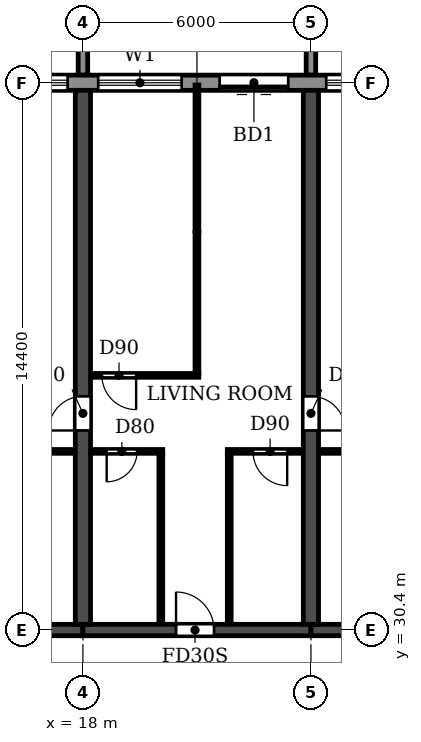
"""IFC4 building model, lengths in metres.
Left out: names, types, materials, properties, quantities, classifications, styles, units other than length and angle.
Written with IfcOpenShell. Run it as: python <this file> out.ifc"""

import sys

from ifc_helpers import new_model, si_unit, direction, frame, frame_2d, origin, place, context, subcontext, project, spatial, polyline, rectangle, outline, extrude, source, transform, mapped, element, fill, save


model = new_model("IFC4")
c1 = context("Model", 3, precision=1e-05, world=origin(), true_north=direction((0.0, 1.0)))
c2 = subcontext(c1, "Body", "Model", "MODEL_VIEW")
j1 = project(units=[si_unit("LENGTHUNIT", "METRE"), si_unit("PLANEANGLEUNIT", "RADIAN")], contexts=[c1])
p1 = place(None, origin())
s1 = spatial("IfcSite", under=j1, at=p1, CompositionType="ELEMENT")
p2 = place(p1, origin())
s2 = spatial("IfcBuilding", under=s1, at=p2, CompositionType="ELEMENT")
p3 = place(p2, frame((0.0, 0.0, 49.8)))
s3 = spatial("IfcBuildingStorey", under=s2, at=p3, CompositionType="ELEMENT", Elevation=49.8)
p4 = place(p3, frame((18.0, 30.55, 0.0), z_axis=(0.0, 0.0, 1.0), x_axis=(0.0, 1.0, 0.0)))
e1 = element("IfcWall", 1, at=p4, inside=s3, PredefinedType="SHEAR", context=c2, shape_type="SweptSolid", body=[
    extrude(rectangle(XDim=14.05, YDim=0.4, at=frame_2d((7.025, 0.0))), origin(), (0.0, 0.0, 1.0), 3.0),
])
p5 = place(p4, frame((5.1, 0.0, 0.0)))
e2 = element("IfcOpeningElement", 2, at=p5, cuts=e1, PredefinedType="OPENING", context=c2, shape_type="SweptSolid", body=[
    extrude(rectangle(XDim=0.9, YDim=2.1, at=frame_2d((0.45, 1.05))), frame((0.0, 0.21, 0.0), z_axis=(0.0, -1.0, 0.0), x_axis=(1.0, 0.0, 0.0)), (0.0, 0.0, 1.0), 0.42),
])
p6 = place(p3, frame((24.0, 30.55, 0.0), z_axis=(0.0, 0.0, 1.0), x_axis=(0.0, 1.0, 0.0)))
e3 = element("IfcWall", 3, at=p6, inside=s3, PredefinedType="SHEAR", context=c2, shape_type="SweptSolid", body=[
    extrude(rectangle(XDim=14.05, YDim=0.4, at=frame_2d((7.025, 0.0))), origin(), (0.0, 0.0, 1.0), 3.0),
])
p7 = place(p6, frame((5.1, 0.0, 0.0)))
e4 = element("IfcOpeningElement", 4, at=p7, cuts=e3, PredefinedType="OPENING", context=c2, shape_type="SweptSolid", body=[
    extrude(rectangle(XDim=0.9, YDim=2.1, at=frame_2d((0.45, 1.05))), frame((0.0, 0.21, 0.0), z_axis=(0.0, -1.0, 0.0), x_axis=(1.0, 0.0, 0.0)), (0.0, 0.0, 1.0), 0.42),
])
p8 = place(p3, frame((12.0, 30.4, 0.0), z_axis=(0.0, 0.0, 1.0), x_axis=(1.0, 0.0, 0.0)))
e5 = element("IfcWall", 5, at=p8, inside=s3, PredefinedType="SHEAR", context=c2, shape_type="SweptSolid", body=[
    extrude(rectangle(XDim=6.0, YDim=0.3, at=frame_2d((3.0, 0.0))), origin(), (0.0, 0.0, 1.0), 2.4),
])
p9 = place(p3, frame((18.0, 30.4, 0.0), z_axis=(0.0, 0.0, 1.0), x_axis=(1.0, 0.0, 0.0)))
e6 = element("IfcWall", 6, at=p9, inside=s3, PredefinedType="SHEAR", context=c2, shape_type="SweptSolid", body=[
    extrude(rectangle(XDim=6.0, YDim=0.3, at=frame_2d((3.0, 0.0))), origin(), (0.0, 0.0, 1.0), 2.4),
])
p10 = place(p9, frame((2.45, 0.0, 0.0)))
e7 = element("IfcOpeningElement", 7, at=p10, cuts=e6, PredefinedType="OPENING", context=c2, shape_type="SweptSolid", body=[
    extrude(rectangle(XDim=1.0, YDim=2.1, at=frame_2d((0.5, 1.05))), frame((0.0, 0.16, 0.0), z_axis=(0.0, -1.0, 0.0), x_axis=(1.0, 0.0, 0.0)), (0.0, 0.0, 1.0), 0.32),
])
p11 = place(p3, frame((24.0, 30.4, 0.0), z_axis=(0.0, 0.0, 1.0), x_axis=(1.0, 0.0, 0.0)))
e8 = element("IfcWall", 8, at=p11, inside=s3, PredefinedType="SHEAR", context=c2, shape_type="SweptSolid", body=[
    extrude(rectangle(XDim=6.0, YDim=0.3, at=frame_2d((3.0, 0.0))), origin(), (0.0, 0.0, 1.0), 2.4),
])
p12 = place(p3, frame((97.317, 44.8, 0.0), z_axis=(0.0, 0.0, 1.0), x_axis=(-1.0, 0.0, 0.0)))
e9 = element("IfcWall", 9, at=p12, inside=s3, PredefinedType="STANDARD", context=c2, shape_type="SweptSolid", body=[
    extrude(rectangle(XDim=92.634, YDim=0.4, at=frame_2d((46.317, 0.0))), origin(), (0.0, 0.0, 1.0), 3.0),
])
p13 = place(p12, frame((88.917, 0.0, 0.0)))
e10 = element("IfcOpeningElement", 10, at=p13, cuts=e9, PredefinedType="OPENING", context=c2, shape_type="SweptSolid", body=[
    extrude(rectangle(XDim=1.8, YDim=2.4, at=frame_2d((0.9, 1.2))), frame((0.0, 0.21, 0.0), z_axis=(0.0, -1.0, 0.0), x_axis=(1.0, 0.0, 0.0)), (0.0, 0.0, 1.0), 0.42),
])
p14 = place(p12, frame((85.717, 0.0, 0.9)))
e11 = element("IfcOpeningElement", 11, at=p14, cuts=e9, PredefinedType="OPENING", context=c2, shape_type="SweptSolid", body=[
    extrude(rectangle(XDim=2.2, YDim=1.5, at=frame_2d((1.1, 0.75))), frame((0.0, 0.21, 0.0), z_axis=(0.0, -1.0, 0.0), x_axis=(1.0, 0.0, 0.0)), (0.0, 0.0, 1.0), 0.42),
])
p15 = place(p12, frame((82.717, 0.0, 0.9)))
e12 = element("IfcOpeningElement", 12, at=p15, cuts=e9, PredefinedType="OPENING", context=c2, shape_type="SweptSolid", body=[
    extrude(rectangle(XDim=2.2, YDim=1.5, at=frame_2d((1.1, 0.75))), frame((0.0, 0.21, 0.0), z_axis=(0.0, -1.0, 0.0), x_axis=(1.0, 0.0, 0.0)), (0.0, 0.0, 1.0), 0.42),
])
p16 = place(p12, frame((79.717, 0.0, 0.9)))
e13 = element("IfcOpeningElement", 13, at=p16, cuts=e9, PredefinedType="OPENING", context=c2, shape_type="SweptSolid", body=[
    extrude(rectangle(XDim=2.2, YDim=1.5, at=frame_2d((1.1, 0.75))), frame((0.0, 0.21, 0.0), z_axis=(0.0, -1.0, 0.0), x_axis=(1.0, 0.0, 0.0)), (0.0, 0.0, 1.0), 0.42),
])
p17 = place(p12, frame((76.717, 0.0, 0.9)))
e14 = element("IfcOpeningElement", 14, at=p17, cuts=e9, PredefinedType="OPENING", context=c2, shape_type="SweptSolid", body=[
    extrude(rectangle(XDim=2.2, YDim=1.5, at=frame_2d((1.1, 0.75))), frame((0.0, 0.21, 0.0), z_axis=(0.0, -1.0, 0.0), x_axis=(1.0, 0.0, 0.0)), (0.0, 0.0, 1.0), 0.42),
])
p18 = place(p12, frame((73.917, 0.0, 0.0)))
e15 = element("IfcOpeningElement", 15, at=p18, cuts=e9, PredefinedType="OPENING", context=c2, shape_type="SweptSolid", body=[
    extrude(rectangle(XDim=1.8, YDim=2.4, at=frame_2d((0.9, 1.2))), frame((0.0, 0.21, 0.0), z_axis=(0.0, -1.0, 0.0), x_axis=(1.0, 0.0, 0.0)), (0.0, 0.0, 1.0), 0.42),
])
p19 = place(p12, frame((70.717, 0.0, 0.9)))
e16 = element("IfcOpeningElement", 16, at=p19, cuts=e9, PredefinedType="OPENING", context=c2, shape_type="SweptSolid", body=[
    extrude(rectangle(XDim=2.2, YDim=1.5, at=frame_2d((1.1, 0.75))), frame((0.0, 0.21, 0.0), z_axis=(0.0, -1.0, 0.0), x_axis=(1.0, 0.0, 0.0)), (0.0, 0.0, 1.0), 0.42),
])
p20 = place(p12, frame((67.717, 0.0, 0.9)))
e17 = element("IfcOpeningElement", 17, at=p20, cuts=e9, PredefinedType="OPENING", context=c2, shape_type="SweptSolid", body=[
    extrude(rectangle(XDim=2.2, YDim=1.5, at=frame_2d((1.1, 0.75))), frame((0.0, 0.21, 0.0), z_axis=(0.0, -1.0, 0.0), x_axis=(1.0, 0.0, 0.0)), (0.0, 0.0, 1.0), 0.42),
])
p21 = place(p12, frame((64.717, 0.0, 0.9)))
e18 = element("IfcOpeningElement", 18, at=p21, cuts=e9, PredefinedType="OPENING", context=c2, shape_type="SweptSolid", body=[
    extrude(rectangle(XDim=2.2, YDim=1.5, at=frame_2d((1.1, 0.75))), frame((0.0, 0.21, 0.0), z_axis=(0.0, -1.0, 0.0), x_axis=(1.0, 0.0, 0.0)), (0.0, 0.0, 1.0), 0.42),
])
p22 = place(p12, frame((61.917, 0.0, 0.0)))
e19 = element("IfcOpeningElement", 19, at=p22, cuts=e9, PredefinedType="OPENING", context=c2, shape_type="SweptSolid", body=[
    extrude(rectangle(XDim=1.8, YDim=2.4, at=frame_2d((0.9, 1.2))), frame((0.0, 0.21, 0.0), z_axis=(0.0, -1.0, 0.0), x_axis=(1.0, 0.0, 0.0)), (0.0, 0.0, 1.0), 0.42),
])
p23 = place(p12, frame((58.717, 0.0, 0.9)))
e20 = element("IfcOpeningElement", 20, at=p23, cuts=e9, PredefinedType="OPENING", context=c2, shape_type="SweptSolid", body=[
    extrude(rectangle(XDim=2.2, YDim=1.5, at=frame_2d((1.1, 0.75))), frame((0.0, 0.21, 0.0), z_axis=(0.0, -1.0, 0.0), x_axis=(1.0, 0.0, 0.0)), (0.0, 0.0, 1.0), 0.42),
])
p24 = place(p12, frame((55.717, 0.0, 0.9)))
e21 = element("IfcOpeningElement", 21, at=p24, cuts=e9, PredefinedType="OPENING", context=c2, shape_type="SweptSolid", body=[
    extrude(rectangle(XDim=2.2, YDim=1.5, at=frame_2d((1.1, 0.75))), frame((0.0, 0.21, 0.0), z_axis=(0.0, -1.0, 0.0), x_axis=(1.0, 0.0, 0.0)), (0.0, 0.0, 1.0), 0.42),
])
p25 = place(p12, frame((52.717, 0.0, 0.9)))
e22 = element("IfcOpeningElement", 22, at=p25, cuts=e9, PredefinedType="OPENING", context=c2, shape_type="SweptSolid", body=[
    extrude(rectangle(XDim=2.2, YDim=1.5, at=frame_2d((1.1, 0.75))), frame((0.0, 0.21, 0.0), z_axis=(0.0, -1.0, 0.0), x_axis=(1.0, 0.0, 0.0)), (0.0, 0.0, 1.0), 0.42),
])
p26 = place(p12, frame((49.917, 0.0, 0.0)))
e23 = element("IfcOpeningElement", 23, at=p26, cuts=e9, PredefinedType="OPENING", context=c2, shape_type="SweptSolid", body=[
    extrude(rectangle(XDim=1.8, YDim=2.4, at=frame_2d((0.9, 1.2))), frame((0.0, 0.21, 0.0), z_axis=(0.0, -1.0, 0.0), x_axis=(1.0, 0.0, 0.0)), (0.0, 0.0, 1.0), 0.42),
])
p27 = place(p12, frame((46.717, 0.0, 0.9)))
e24 = element("IfcOpeningElement", 24, at=p27, cuts=e9, PredefinedType="OPENING", context=c2, shape_type="SweptSolid", body=[
    extrude(rectangle(XDim=2.2, YDim=1.5, at=frame_2d((1.1, 0.75))), frame((0.0, 0.21, 0.0), z_axis=(0.0, -1.0, 0.0), x_axis=(1.0, 0.0, 0.0)), (0.0, 0.0, 1.0), 0.42),
])
p28 = place(p12, frame((43.717, 0.0, 0.9)))
e25 = element("IfcOpeningElement", 25, at=p28, cuts=e9, PredefinedType="OPENING", context=c2, shape_type="SweptSolid", body=[
    extrude(rectangle(XDim=2.2, YDim=1.5, at=frame_2d((1.1, 0.75))), frame((0.0, 0.21, 0.0), z_axis=(0.0, -1.0, 0.0), x_axis=(1.0, 0.0, 0.0)), (0.0, 0.0, 1.0), 0.42),
])
p29 = place(p12, frame((40.717, 0.0, 0.9)))
e26 = element("IfcOpeningElement", 26, at=p29, cuts=e9, PredefinedType="OPENING", context=c2, shape_type="SweptSolid", body=[
    extrude(rectangle(XDim=2.2, YDim=1.5, at=frame_2d((1.1, 0.75))), frame((0.0, 0.21, 0.0), z_axis=(0.0, -1.0, 0.0), x_axis=(1.0, 0.0, 0.0)), (0.0, 0.0, 1.0), 0.42),
])
p30 = place(p12, frame((37.917, 0.0, 0.0)))
e27 = element("IfcOpeningElement", 27, at=p30, cuts=e9, PredefinedType="OPENING", context=c2, shape_type="SweptSolid", body=[
    extrude(rectangle(XDim=1.8, YDim=2.4, at=frame_2d((0.9, 1.2))), frame((0.0, 0.21, 0.0), z_axis=(0.0, -1.0, 0.0), x_axis=(1.0, 0.0, 0.0)), (0.0, 0.0, 1.0), 0.42),
])
p31 = place(p12, frame((34.717, 0.0, 0.9)))
e28 = element("IfcOpeningElement", 28, at=p31, cuts=e9, PredefinedType="OPENING", context=c2, shape_type="SweptSolid", body=[
    extrude(rectangle(XDim=2.2, YDim=1.5, at=frame_2d((1.1, 0.75))), frame((0.0, 0.21, 0.0), z_axis=(0.0, -1.0, 0.0), x_axis=(1.0, 0.0, 0.0)), (0.0, 0.0, 1.0), 0.42),
])
p32 = place(p12, frame((31.717, 0.0, 0.9)))
e29 = element("IfcOpeningElement", 29, at=p32, cuts=e9, PredefinedType="OPENING", context=c2, shape_type="SweptSolid", body=[
    extrude(rectangle(XDim=2.2, YDim=1.5, at=frame_2d((1.1, 0.75))), frame((0.0, 0.21, 0.0), z_axis=(0.0, -1.0, 0.0), x_axis=(1.0, 0.0, 0.0)), (0.0, 0.0, 1.0), 0.42),
])
p33 = place(p12, frame((28.717, 0.0, 0.9)))
e30 = element("IfcOpeningElement", 30, at=p33, cuts=e9, PredefinedType="OPENING", context=c2, shape_type="SweptSolid", body=[
    extrude(rectangle(XDim=2.2, YDim=1.5, at=frame_2d((1.1, 0.75))), frame((0.0, 0.21, 0.0), z_axis=(0.0, -1.0, 0.0), x_axis=(1.0, 0.0, 0.0)), (0.0, 0.0, 1.0), 0.42),
])
p34 = place(p12, frame((25.917, 0.0, 0.0)))
e31 = element("IfcOpeningElement", 31, at=p34, cuts=e9, PredefinedType="OPENING", context=c2, shape_type="SweptSolid", body=[
    extrude(rectangle(XDim=1.8, YDim=2.4, at=frame_2d((0.9, 1.2))), frame((0.0, 0.21, 0.0), z_axis=(0.0, -1.0, 0.0), x_axis=(1.0, 0.0, 0.0)), (0.0, 0.0, 1.0), 0.42),
])
p35 = place(p12, frame((22.917, 0.0, 0.0)))
e32 = element("IfcOpeningElement", 32, at=p35, cuts=e9, PredefinedType="OPENING", context=c2, shape_type="SweptSolid", body=[
    extrude(rectangle(XDim=1.8, YDim=2.4, at=frame_2d((0.9, 1.2))), frame((0.0, 0.21, 0.0), z_axis=(0.0, -1.0, 0.0), x_axis=(1.0, 0.0, 0.0)), (0.0, 0.0, 1.0), 0.42),
])
p36 = place(p12, frame((19.717, 0.0, 0.9)))
e33 = element("IfcOpeningElement", 33, at=p36, cuts=e9, PredefinedType="OPENING", context=c2, shape_type="SweptSolid", body=[
    extrude(rectangle(XDim=2.2, YDim=1.5, at=frame_2d((1.1, 0.75))), frame((0.0, 0.21, 0.0), z_axis=(0.0, -1.0, 0.0), x_axis=(1.0, 0.0, 0.0)), (0.0, 0.0, 1.0), 0.42),
])
p37 = place(p12, frame((16.717, 0.0, 0.9)))
e34 = element("IfcOpeningElement", 34, at=p37, cuts=e9, PredefinedType="OPENING", context=c2, shape_type="SweptSolid", body=[
    extrude(rectangle(XDim=2.2, YDim=1.5, at=frame_2d((1.1, 0.75))), frame((0.0, 0.21, 0.0), z_axis=(0.0, -1.0, 0.0), x_axis=(1.0, 0.0, 0.0)), (0.0, 0.0, 1.0), 0.42),
])
p38 = place(p12, frame((13.717, 0.0, 0.9)))
e35 = element("IfcOpeningElement", 35, at=p38, cuts=e9, PredefinedType="OPENING", context=c2, shape_type="SweptSolid", body=[
    extrude(rectangle(XDim=2.2, YDim=1.5, at=frame_2d((1.1, 0.75))), frame((0.0, 0.21, 0.0), z_axis=(0.0, -1.0, 0.0), x_axis=(1.0, 0.0, 0.0)), (0.0, 0.0, 1.0), 0.42),
])
p39 = place(p12, frame((10.717, 0.0, 0.9)))
e36 = element("IfcOpeningElement", 36, at=p39, cuts=e9, PredefinedType="OPENING", context=c2, shape_type="SweptSolid", body=[
    extrude(rectangle(XDim=2.2, YDim=1.5, at=frame_2d((1.1, 0.75))), frame((0.0, 0.21, 0.0), z_axis=(0.0, -1.0, 0.0), x_axis=(1.0, 0.0, 0.0)), (0.0, 0.0, 1.0), 0.42),
])
p40 = place(p12, frame((7.917, 0.0, 0.0)))
e37 = element("IfcOpeningElement", 37, at=p40, cuts=e9, PredefinedType="OPENING", context=c2, shape_type="SweptSolid", body=[
    extrude(rectangle(XDim=1.8, YDim=2.4, at=frame_2d((0.9, 1.2))), frame((0.0, 0.21, 0.0), z_axis=(0.0, -1.0, 0.0), x_axis=(1.0, 0.0, 0.0)), (0.0, 0.0, 1.0), 0.42),
])
p41 = place(p12, frame((4.717, 0.0, 0.9)))
e38 = element("IfcOpeningElement", 38, at=p41, cuts=e9, PredefinedType="OPENING", context=c2, shape_type="SweptSolid", body=[
    extrude(rectangle(XDim=2.2, YDim=1.5, at=frame_2d((1.1, 0.75))), frame((0.0, 0.21, 0.0), z_axis=(0.0, -1.0, 0.0), x_axis=(1.0, 0.0, 0.0)), (0.0, 0.0, 1.0), 0.42),
])
p42 = place(p12, frame((1.917, 0.0, 0.0)))
e39 = element("IfcOpeningElement", 39, at=p42, cuts=e9, PredefinedType="OPENING", context=c2, shape_type="SweptSolid", body=[
    extrude(rectangle(XDim=1.8, YDim=2.4, at=frame_2d((0.9, 1.2))), frame((0.0, 0.21, 0.0), z_axis=(0.0, -1.0, 0.0), x_axis=(1.0, 0.0, 0.0)), (0.0, 0.0, 1.0), 0.42),
])
m1 = source(origin(), c2, "Body", "SweptSolid", [
    extrude(outline(polyline([(0.0, 0.0), (0.25, 0.0), (0.25, 3.1), (0.0, 3.1), (0.0, 0.0)])), origin(), (0.0, 0.0, 1.0), 3.1),
])
for number, where in (
    (40, (17.875, 45.0, 0.0)),
    (41, (23.875, 45.0, 0.0)),
):
    element("IfcWall", number, at=place(p3, frame(where)), inside=s3, PredefinedType="STANDARD", context=c2, shape_type="MappedRepresentation", body=[
        mapped(m1, transform((0.0, 0.0, 0.0))),
    ])
p43 = place(p3, frame((14.9, 35.1, 0.0), z_axis=(0.0, 0.0, 1.0), x_axis=(1.0, 0.0, 0.0)))
e42 = element("IfcWall", 42, at=p43, inside=s3, PredefinedType="PARTITIONING", context=c2, shape_type="SweptSolid", body=[
    extrude(rectangle(XDim=2.89, YDim=0.1, at=frame_2d((1.445, 0.0))), origin(), (0.0, 0.0, 1.0), 3.0),
])
p44 = place(p43, frame((1.2, 0.0, 0.0)))
e43 = element("IfcOpeningElement", 43, at=p44, cuts=e42, PredefinedType="OPENING", context=c2, shape_type="SweptSolid", body=[
    extrude(rectangle(XDim=0.8, YDim=2.1, at=frame_2d((0.4, 1.05))), frame((0.0, 0.06, 0.0), z_axis=(0.0, -1.0, 0.0), x_axis=(1.0, 0.0, 0.0)), (0.0, 0.0, 1.0), 0.12),
])
p45 = place(p3, frame((18.21, 35.1, 0.0), z_axis=(0.0, 0.0, 1.0), x_axis=(1.0, 0.0, 0.0)))
e44 = element("IfcWall", 44, at=p45, inside=s3, PredefinedType="PARTITIONING", context=c2, shape_type="SweptSolid", body=[
    extrude(rectangle(XDim=1.89, YDim=0.1, at=frame_2d((0.945, 0.0))), origin(), (0.0, 0.0, 1.0), 3.0),
])
p46 = place(p45, frame((0.415, 0.0, 0.0)))
e45 = element("IfcOpeningElement", 45, at=p46, cuts=e44, PredefinedType="OPENING", context=c2, shape_type="SweptSolid", body=[
    extrude(rectangle(XDim=0.8, YDim=2.1, at=frame_2d((0.4, 1.05))), frame((0.0, 0.06, 0.0), z_axis=(0.0, -1.0, 0.0), x_axis=(1.0, 0.0, 0.0)), (0.0, 0.0, 1.0), 0.12),
])
p47 = place(p3, frame((21.8, 35.1, 0.0), z_axis=(0.0, 0.0, 1.0), x_axis=(1.0, 0.0, 0.0)))
e46 = element("IfcWall", 46, at=p47, inside=s3, PredefinedType="PARTITIONING", context=c2, shape_type="SweptSolid", body=[
    extrude(rectangle(XDim=1.99, YDim=0.1, at=frame_2d((0.995, 0.0))), origin(), (0.0, 0.0, 1.0), 3.0),
])
p48 = place(p47, frame((0.675, 0.0, 0.0)))
e47 = element("IfcOpeningElement", 47, at=p48, cuts=e46, PredefinedType="OPENING", context=c2, shape_type="SweptSolid", body=[
    extrude(rectangle(XDim=0.9, YDim=2.1, at=frame_2d((0.45, 1.05))), frame((0.0, 0.06, 0.0), z_axis=(0.0, -1.0, 0.0), x_axis=(1.0, 0.0, 0.0)), (0.0, 0.0, 1.0), 0.12),
])
p49 = place(p3, frame((24.21, 35.1, 0.0), z_axis=(0.0, 0.0, 1.0), x_axis=(1.0, 0.0, 0.0)))
e48 = element("IfcWall", 48, at=p49, inside=s3, PredefinedType="PARTITIONING", context=c2, shape_type="SweptSolid", body=[
    extrude(rectangle(XDim=2.69, YDim=0.1, at=frame_2d((1.345, 0.0))), origin(), (0.0, 0.0, 1.0), 3.0),
])
p50 = place(p49, frame((0.89, 0.0, 0.0)))
e49 = element("IfcOpeningElement", 49, at=p50, cuts=e48, PredefinedType="OPENING", context=c2, shape_type="SweptSolid", body=[
    extrude(rectangle(XDim=0.8, YDim=2.1, at=frame_2d((0.4, 1.05))), frame((0.0, 0.06, 0.0), z_axis=(0.0, -1.0, 0.0), x_axis=(1.0, 0.0, 0.0)), (0.0, 0.0, 1.0), 0.12),
])
p51 = place(p3, frame((18.21, 37.1, 0.0), z_axis=(0.0, 0.0, 1.0), x_axis=(1.0, 0.0, 0.0)))
e50 = element("IfcWall", 50, at=p51, inside=s3, PredefinedType="PARTITIONING", context=c2, shape_type="SweptSolid", body=[
    extrude(rectangle(XDim=2.84, YDim=0.1, at=frame_2d((1.42, 0.0))), origin(), (0.0, 0.0, 1.0), 3.0),
])
p52 = place(p51, frame((0.29, 0.0, 0.0)))
e51 = element("IfcOpeningElement", 51, at=p52, cuts=e50, PredefinedType="OPENING", context=c2, shape_type="SweptSolid", body=[
    extrude(rectangle(XDim=0.9, YDim=2.1, at=frame_2d((0.45, 1.05))), frame((0.0, 0.06, 0.0), z_axis=(0.0, -1.0, 0.0), x_axis=(1.0, 0.0, 0.0)), (0.0, 0.0, 1.0), 0.12),
])
p53 = place(p3, frame((20.05, 30.56, 0.0), z_axis=(0.0, 0.0, 1.0), x_axis=(0.0, 1.0, 0.0)))
e52 = element("IfcWall", 52, at=p53, inside=s3, PredefinedType="PARTITIONING", context=c2, shape_type="SweptSolid", body=[
    extrude(rectangle(XDim=4.49, YDim=0.1, at=frame_2d((2.245, 0.0))), origin(), (0.0, 0.0, 1.0), 3.0),
])
p54 = place(p3, frame((21.0, 37.15, 0.0), z_axis=(0.0, 0.0, 1.0), x_axis=(0.0, 1.0, 0.0)))
e53 = element("IfcWall", 53, at=p54, inside=s3, PredefinedType="PARTITIONING", context=c2, shape_type="SweptSolid", body=[
    extrude(rectangle(XDim=7.59, YDim=0.1, at=frame_2d((3.795, 0.0))), origin(), (0.0, 0.0, 1.0), 3.0),
])
p55 = place(p3, frame((21.85, 30.56, 0.0), z_axis=(0.0, 0.0, 1.0), x_axis=(0.0, 1.0, 0.0)))
e54 = element("IfcWall", 54, at=p55, inside=s3, PredefinedType="PARTITIONING", context=c2, shape_type="SweptSolid", body=[
    extrude(rectangle(XDim=4.49, YDim=0.1, at=frame_2d((2.245, 0.0))), origin(), (0.0, 0.0, 1.0), 3.0),
])
p56 = place(p16, origin())
e55 = element("IfcWindow", 55, at=p56, inside=s3, PartitioningType="DOUBLE_PANEL_HORIZONTAL", PredefinedType="WINDOW", context=c2, shape_type="SweptSolid", body=[
    extrude(rectangle(XDim=2.2, YDim=1.5, at=frame_2d((1.1, 0.75))), frame((0.0, 0.03, 0.0), z_axis=(0.0, -1.0, 0.0), x_axis=(1.0, 0.0, 0.0)), (0.0, 0.0, 1.0), 0.06),
])
fill(e13, e55)
p57 = place(p17, origin())
e56 = element("IfcWindow", 56, at=p57, inside=s3, PartitioningType="DOUBLE_PANEL_HORIZONTAL", PredefinedType="WINDOW", context=c2, shape_type="SweptSolid", body=[
    extrude(rectangle(XDim=2.2, YDim=1.5, at=frame_2d((1.1, 0.75))), frame((0.0, 0.03, 0.0), z_axis=(0.0, -1.0, 0.0), x_axis=(1.0, 0.0, 0.0)), (0.0, 0.0, 1.0), 0.06),
])
fill(e14, e56)
p58 = place(p18, origin())
e57 = element("IfcDoor", 57, at=p58, inside=s3, OperationType="DOUBLE_DOOR_SLIDING", PredefinedType="DOOR", context=c2, shape_type="SweptSolid", body=[
    extrude(rectangle(XDim=1.8, YDim=2.4, at=frame_2d((0.9, 1.2))), frame((0.0, 0.025, 0.0), z_axis=(0.0, -1.0, 0.0), x_axis=(1.0, 0.0, 0.0)), (0.0, 0.0, 1.0), 0.05),
])
fill(e15, e57)
p59 = place(p19, origin())
e58 = element("IfcWindow", 58, at=p59, inside=s3, PartitioningType="DOUBLE_PANEL_HORIZONTAL", PredefinedType="WINDOW", context=c2, shape_type="SweptSolid", body=[
    extrude(rectangle(XDim=2.2, YDim=1.5, at=frame_2d((1.1, 0.75))), frame((0.0, 0.03, 0.0), z_axis=(0.0, -1.0, 0.0), x_axis=(1.0, 0.0, 0.0)), (0.0, 0.0, 1.0), 0.06),
])
fill(e16, e58)
p60 = place(p5, origin())
e59 = element("IfcDoor", 59, at=p60, inside=s3, OperationType="SINGLE_SWING_LEFT", PredefinedType="DOOR", context=c2, shape_type="SweptSolid", body=[
    extrude(rectangle(XDim=0.9, YDim=2.1, at=frame_2d((0.45, 1.05))), frame((0.0, 0.025, 0.0), z_axis=(0.0, -1.0, 0.0), x_axis=(1.0, 0.0, 0.0)), (0.0, 0.0, 1.0), 0.05),
])
fill(e2, e59)
p61 = place(p52, frame((0.9, 0.0, 0.0), z_axis=(0.0, 0.0, 1.0), x_axis=(-1.0, 0.0, 0.0)))
e60 = element("IfcDoor", 60, at=p61, inside=s3, OperationType="SINGLE_SWING_LEFT", PredefinedType="DOOR", context=c2, shape_type="SweptSolid", body=[
    extrude(rectangle(XDim=0.9, YDim=2.1, at=frame_2d((0.45, 1.05))), frame((0.0, 0.025, 0.0), z_axis=(0.0, -1.0, 0.0), x_axis=(1.0, 0.0, 0.0)), (0.0, 0.0, 1.0), 0.05),
])
fill(e51, e60)
p62 = place(p46, frame((0.8, 0.0, 0.0), z_axis=(0.0, 0.0, 1.0), x_axis=(-1.0, 0.0, 0.0)))
e61 = element("IfcDoor", 61, at=p62, inside=s3, OperationType="SINGLE_SWING_RIGHT", PredefinedType="DOOR", context=c2, shape_type="SweptSolid", body=[
    extrude(rectangle(XDim=0.8, YDim=2.1, at=frame_2d((0.4, 1.05))), frame((0.0, 0.025, 0.0), z_axis=(0.0, -1.0, 0.0), x_axis=(1.0, 0.0, 0.0)), (0.0, 0.0, 1.0), 0.05),
])
fill(e45, e61)
p63 = place(p10, origin())
e62 = element("IfcDoor", 62, at=p63, inside=s3, OperationType="SINGLE_SWING_LEFT", PredefinedType="DOOR", context=c2, shape_type="SweptSolid", body=[
    extrude(rectangle(XDim=1.0, YDim=2.1, at=frame_2d((0.5, 1.05))), frame((0.0, 0.025, 0.0), z_axis=(0.0, -1.0, 0.0), x_axis=(1.0, 0.0, 0.0)), (0.0, 0.0, 1.0), 0.05),
])
fill(e7, e62)
p64 = place(p48, frame((0.9, 0.0, 0.0), z_axis=(0.0, 0.0, 1.0), x_axis=(-1.0, 0.0, 0.0)))
e63 = element("IfcDoor", 63, at=p64, inside=s3, OperationType="SINGLE_SWING_LEFT", PredefinedType="DOOR", context=c2, shape_type="SweptSolid", body=[
    extrude(rectangle(XDim=0.9, YDim=2.1, at=frame_2d((0.45, 1.05))), frame((0.0, 0.025, 0.0), z_axis=(0.0, -1.0, 0.0), x_axis=(1.0, 0.0, 0.0)), (0.0, 0.0, 1.0), 0.05),
])
fill(e47, e63)
p65 = place(p7, frame((0.9, 0.0, 0.0), z_axis=(0.0, 0.0, 1.0), x_axis=(-1.0, 0.0, 0.0)))
e64 = element("IfcDoor", 64, at=p65, inside=s3, OperationType="SINGLE_SWING_RIGHT", PredefinedType="DOOR", context=c2, shape_type="SweptSolid", body=[
    extrude(rectangle(XDim=0.9, YDim=2.1, at=frame_2d((0.45, 1.05))), frame((0.0, 0.025, 0.0), z_axis=(0.0, -1.0, 0.0), x_axis=(1.0, 0.0, 0.0)), (0.0, 0.0, 1.0), 0.05),
])
fill(e4, e64)
save(model, sys.argv[1])
